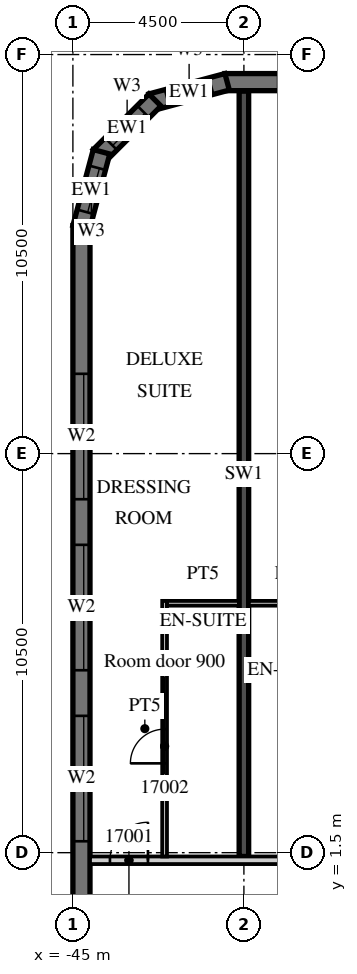
"""IFC4 building model, lengths in metres.
Left out: names, types, materials, properties, quantities, classifications, styles, units other than length and angle.
Written with IfcOpenShell. Run it as: python <this file> out.ifc"""

import sys

from ifc_helpers import new_model, si_unit, direction, frame, frame_2d, origin, place, context, subcontext, project, spatial, polyline, rectangle, outline, extrude, element, fill, save


model = new_model("IFC4")
c1 = context("Model", 3, precision=1e-05, world=origin(), true_north=direction((0.0, 1.0)))
c2 = subcontext(c1, "Body", "Model", "MODEL_VIEW")
j1 = project(units=[si_unit("LENGTHUNIT", "METRE"), si_unit("PLANEANGLEUNIT", "RADIAN")], contexts=[c1])
p1 = place(None, origin())
s1 = spatial("IfcSite", under=j1, at=p1, CompositionType="ELEMENT")
p2 = place(p1, origin())
s2 = spatial("IfcBuilding", under=s1, at=p2, CompositionType="ELEMENT")
p3 = place(p2, frame((0.0, 0.0, 86.4)))
s3 = spatial("IfcBuildingStorey", under=s2, at=p3, CompositionType="ELEMENT", Elevation=86.4)
p4 = place(p3, frame((-40.5, 1.4, 0.0), z_axis=(0.0, 0.0, 1.0), x_axis=(0.0, 1.0, 0.0)))
e1 = element("IfcWall", 1, at=p4, inside=s3, PredefinedType="SHEAR", context=c2, shape_type="SweptSolid", body=[
    extrude(rectangle(XDim=20.14, YDim=0.25, at=frame_2d((10.07, 0.0))), origin(), (0.0, 0.0, 1.0), 3.3),
])
p5 = place(p3, frame((13.5, 21.775, 0.0), z_axis=(0.0, 0.0, 1.0), x_axis=(-1.0, 0.0, 0.0)))
e2 = element("IfcWall", 2, at=p5, inside=s3, PredefinedType="SOLIDWALL", context=c2, shape_type="SweptSolid", body=[
    extrude(rectangle(XDim=54.5, YDim=0.45, at=frame_2d((27.25, 0.0))), origin(), (0.0, 0.0, 1.0), 3.02),
])
p6 = place(p5, frame((0.9, 0.0, 0.45)))
e3 = element("IfcOpeningElement", 3, at=p6, cuts=e2, PredefinedType="OPENING", context=c2, shape_type="SweptSolid", body=[
    extrude(rectangle(XDim=2.7, YDim=2.25, at=frame_2d((1.35, 1.125))), frame((0.0, 0.235, 0.0), z_axis=(0.0, -1.0, 0.0), x_axis=(1.0, 0.0, 0.0)), (0.0, 0.0, 1.0), 0.47),
])
p7 = place(p5, frame((5.4, 0.0, 0.45)))
e4 = element("IfcOpeningElement", 4, at=p7, cuts=e2, PredefinedType="OPENING", context=c2, shape_type="SweptSolid", body=[
    extrude(rectangle(XDim=2.7, YDim=2.25, at=frame_2d((1.35, 1.125))), frame((0.0, 0.235, 0.0), z_axis=(0.0, -1.0, 0.0), x_axis=(1.0, 0.0, 0.0)), (0.0, 0.0, 1.0), 0.47),
])
p8 = place(p5, frame((9.9, 0.0, 0.45)))
e5 = element("IfcOpeningElement", 5, at=p8, cuts=e2, PredefinedType="OPENING", context=c2, shape_type="SweptSolid", body=[
    extrude(rectangle(XDim=2.7, YDim=2.25, at=frame_2d((1.35, 1.125))), frame((0.0, 0.235, 0.0), z_axis=(0.0, -1.0, 0.0), x_axis=(1.0, 0.0, 0.0)), (0.0, 0.0, 1.0), 0.47),
])
p9 = place(p5, frame((14.4, 0.0, 0.45)))
e6 = element("IfcOpeningElement", 6, at=p9, cuts=e2, PredefinedType="OPENING", context=c2, shape_type="SweptSolid", body=[
    extrude(rectangle(XDim=2.7, YDim=2.25, at=frame_2d((1.35, 1.125))), frame((0.0, 0.235, 0.0), z_axis=(0.0, -1.0, 0.0), x_axis=(1.0, 0.0, 0.0)), (0.0, 0.0, 1.0), 0.47),
])
p10 = place(p5, frame((18.9, 0.0, 0.45)))
e7 = element("IfcOpeningElement", 7, at=p10, cuts=e2, PredefinedType="OPENING", context=c2, shape_type="SweptSolid", body=[
    extrude(rectangle(XDim=2.7, YDim=2.25, at=frame_2d((1.35, 1.125))), frame((0.0, 0.235, 0.0), z_axis=(0.0, -1.0, 0.0), x_axis=(1.0, 0.0, 0.0)), (0.0, 0.0, 1.0), 0.47),
])
p11 = place(p5, frame((23.4, 0.0, 0.45)))
e8 = element("IfcOpeningElement", 8, at=p11, cuts=e2, PredefinedType="OPENING", context=c2, shape_type="SweptSolid", body=[
    extrude(rectangle(XDim=2.7, YDim=2.25, at=frame_2d((1.35, 1.125))), frame((0.0, 0.235, 0.0), z_axis=(0.0, -1.0, 0.0), x_axis=(1.0, 0.0, 0.0)), (0.0, 0.0, 1.0), 0.47),
])
p12 = place(p5, frame((27.9, 0.0, 0.45)))
e9 = element("IfcOpeningElement", 9, at=p12, cuts=e2, PredefinedType="OPENING", context=c2, shape_type="SweptSolid", body=[
    extrude(rectangle(XDim=2.7, YDim=2.25, at=frame_2d((1.35, 1.125))), frame((0.0, 0.235, 0.0), z_axis=(0.0, -1.0, 0.0), x_axis=(1.0, 0.0, 0.0)), (0.0, 0.0, 1.0), 0.47),
])
p13 = place(p5, frame((32.4, 0.0, 0.45)))
e10 = element("IfcOpeningElement", 10, at=p13, cuts=e2, PredefinedType="OPENING", context=c2, shape_type="SweptSolid", body=[
    extrude(rectangle(XDim=2.7, YDim=2.25, at=frame_2d((1.35, 1.125))), frame((0.0, 0.235, 0.0), z_axis=(0.0, -1.0, 0.0), x_axis=(1.0, 0.0, 0.0)), (0.0, 0.0, 1.0), 0.47),
])
p14 = place(p5, frame((36.9, 0.0, 0.45)))
e11 = element("IfcOpeningElement", 11, at=p14, cuts=e2, PredefinedType="OPENING", context=c2, shape_type="SweptSolid", body=[
    extrude(rectangle(XDim=2.7, YDim=2.25, at=frame_2d((1.35, 1.125))), frame((0.0, 0.235, 0.0), z_axis=(0.0, -1.0, 0.0), x_axis=(1.0, 0.0, 0.0)), (0.0, 0.0, 1.0), 0.47),
])
p15 = place(p5, frame((41.4, 0.0, 0.45)))
e12 = element("IfcOpeningElement", 12, at=p15, cuts=e2, PredefinedType="OPENING", context=c2, shape_type="SweptSolid", body=[
    extrude(rectangle(XDim=2.7, YDim=2.25, at=frame_2d((1.35, 1.125))), frame((0.0, 0.235, 0.0), z_axis=(0.0, -1.0, 0.0), x_axis=(1.0, 0.0, 0.0)), (0.0, 0.0, 1.0), 0.47),
])
p16 = place(p5, frame((45.9, 0.0, 0.45)))
e13 = element("IfcOpeningElement", 13, at=p16, cuts=e2, PredefinedType="OPENING", context=c2, shape_type="SweptSolid", body=[
    extrude(rectangle(XDim=2.7, YDim=2.25, at=frame_2d((1.35, 1.125))), frame((0.0, 0.235, 0.0), z_axis=(0.0, -1.0, 0.0), x_axis=(1.0, 0.0, 0.0)), (0.0, 0.0, 1.0), 0.47),
])
p17 = place(p5, frame((50.4, 0.0, 0.45)))
e14 = element("IfcOpeningElement", 14, at=p17, cuts=e2, PredefinedType="OPENING", context=c2, shape_type="SweptSolid", body=[
    extrude(rectangle(XDim=2.7, YDim=2.25, at=frame_2d((1.35, 1.125))), frame((0.0, 0.235, 0.0), z_axis=(0.0, -1.0, 0.0), x_axis=(1.0, 0.0, 0.0)), (0.0, 0.0, 1.0), 0.47),
])
p18 = place(p3, frame((-40.942, 21.783, 0.0), z_axis=(0.0, 0.0, 1.0), x_axis=(-0.965926999034, -0.25881466832, 0.0)))
e15 = element("IfcWall", 15, at=p18, inside=s3, PredefinedType="SOLIDWALL", context=c2, shape_type="SweptSolid", body=[
    extrude(outline(polyline([(0.0, -0.225), (2.071, -0.225), (1.95, 0.225), (0.121, 0.225), (0.0, -0.225)])), origin(), (0.0, 0.0, 1.0), 3.02),
])
p19 = place(p18, frame((0.435, 0.0, 0.45)))
e16 = element("IfcOpeningElement", 16, at=p19, cuts=e15, PredefinedType="OPENING", context=c2, shape_type="SweptSolid", body=[
    extrude(rectangle(XDim=1.2, YDim=2.25, at=frame_2d((0.6, 1.125))), frame((0.0, 0.235, 0.0), z_axis=(0.0, -1.0, 0.0), x_axis=(1.0, 0.0, 0.0)), (0.0, 0.0, 1.0), 0.47),
])
p20 = place(p3, frame((-42.841, 21.305, 0.0), z_axis=(0.0, 0.0, 1.0), x_axis=(-0.707106781187, -0.707106781187, 0.0)))
e17 = element("IfcWall", 17, at=p20, inside=s3, PredefinedType="SOLIDWALL", context=c2, shape_type="SweptSolid", body=[
    extrude(outline(polyline([(0.0, -0.225), (2.071, -0.225), (1.95, 0.225), (0.121, 0.225), (0.0, -0.225)])), origin(), (0.0, 0.0, 1.0), 3.02),
])
p21 = place(p20, frame((0.435, 0.0, 0.45)))
e18 = element("IfcOpeningElement", 18, at=p21, cuts=e17, PredefinedType="OPENING", context=c2, shape_type="SweptSolid", body=[
    extrude(rectangle(XDim=1.2, YDim=2.25, at=frame_2d((0.6, 1.125))), frame((0.0, 0.235, 0.0), z_axis=(0.0, -1.0, 0.0), x_axis=(1.0, 0.0, 0.0)), (0.0, 0.0, 1.0), 0.47),
])
p22 = place(p3, frame((-44.247, 19.942, 0.0), z_axis=(0.0, 0.0, 1.0), x_axis=(-0.25881466832, -0.965926999034, 0.0)))
e19 = element("IfcWall", 19, at=p22, inside=s3, PredefinedType="SOLIDWALL", context=c2, shape_type="SweptSolid", body=[
    extrude(outline(polyline([(-0.0, -0.225), (2.07, -0.225), (1.95, 0.225), (0.12, 0.225), (-0.0, -0.225)])), origin(), (0.0, 0.0, 1.0), 3.02),
])
p23 = place(p22, frame((0.435, 0.0, 0.45)))
e20 = element("IfcOpeningElement", 20, at=p23, cuts=e19, PredefinedType="OPENING", context=c2, shape_type="SweptSolid", body=[
    extrude(rectangle(XDim=1.2, YDim=2.25, at=frame_2d((0.6, 1.125))), frame((0.0, 0.235, 0.0), z_axis=(0.0, -1.0, 0.0), x_axis=(1.0, 0.0, 0.0)), (0.0, 0.0, 1.0), 0.47),
])
p24 = place(p3, frame((-44.775, 18.0, 0.0), z_axis=(0.0, 0.0, 1.0), x_axis=(0.0, -1.0, 0.0)))
e21 = element("IfcWall", 21, at=p24, inside=s3, PredefinedType="SOLIDWALL", context=c2, shape_type="SweptSolid", body=[
    extrude(rectangle(XDim=36.0, YDim=0.45, at=frame_2d((18.0, 0.0))), origin(), (0.0, 0.0, 1.0), 3.02),
])
p25 = place(p24, frame((3.9, 0.0, 0.45)))
e22 = element("IfcOpeningElement", 22, at=p25, cuts=e21, PredefinedType="OPENING", context=c2, shape_type="SweptSolid", body=[
    extrude(rectangle(XDim=3.3, YDim=2.25, at=frame_2d((1.65, 1.125))), frame((0.0, 0.235, 0.0), z_axis=(0.0, -1.0, 0.0), x_axis=(1.0, 0.0, 0.0)), (0.0, 0.0, 1.0), 0.47),
])
p26 = place(p24, frame((8.4, 0.0, 0.45)))
e23 = element("IfcOpeningElement", 23, at=p26, cuts=e21, PredefinedType="OPENING", context=c2, shape_type="SweptSolid", body=[
    extrude(rectangle(XDim=3.3, YDim=2.25, at=frame_2d((1.65, 1.125))), frame((0.0, 0.235, 0.0), z_axis=(0.0, -1.0, 0.0), x_axis=(1.0, 0.0, 0.0)), (0.0, 0.0, 1.0), 0.47),
])
p27 = place(p24, frame((12.9, 0.0, 0.45)))
e24 = element("IfcOpeningElement", 24, at=p27, cuts=e21, PredefinedType="OPENING", context=c2, shape_type="SweptSolid", body=[
    extrude(rectangle(XDim=3.3, YDim=2.25, at=frame_2d((1.65, 1.125))), frame((0.0, 0.235, 0.0), z_axis=(0.0, -1.0, 0.0), x_axis=(1.0, 0.0, 0.0)), (0.0, 0.0, 1.0), 0.47),
])
p28 = place(p3, frame((-44.55, 1.3, 0.0), z_axis=(0.0, 0.0, 1.0), x_axis=(1.0, 0.0, 0.0)))
e25 = element("IfcWall", 25, at=p28, inside=s3, PredefinedType="PARTITIONING", context=c2, shape_type="SweptSolid", body=[
    extrude(rectangle(XDim=58.05, YDim=0.2, at=frame_2d((29.025, 0.0))), origin(), (0.0, 0.0, 1.0), 3.02),
])
p29 = place(p28, frame((0.525, 0.0, 0.0)))
e26 = element("IfcOpeningElement", 26, at=p29, cuts=e25, PredefinedType="OPENING", context=c2, shape_type="SweptSolid", body=[
    extrude(rectangle(XDim=1.0, YDim=2.1, at=frame_2d((0.5, 1.05))), frame((0.0, 0.11, 0.0), z_axis=(0.0, -1.0, 0.0), x_axis=(1.0, 0.0, 0.0)), (0.0, 0.0, 1.0), 0.22),
])
p30 = place(p28, frame((6.975, 0.0, 0.0)))
e27 = element("IfcOpeningElement", 27, at=p30, cuts=e25, PredefinedType="OPENING", context=c2, shape_type="SweptSolid", body=[
    extrude(rectangle(XDim=1.0, YDim=2.1, at=frame_2d((0.5, 1.05))), frame((0.0, 0.11, 0.0), z_axis=(0.0, -1.0, 0.0), x_axis=(1.0, 0.0, 0.0)), (0.0, 0.0, 1.0), 0.22),
])
p31 = place(p28, frame((11.5, 0.0, 0.0)))
e28 = element("IfcOpeningElement", 28, at=p31, cuts=e25, PredefinedType="OPENING", context=c2, shape_type="SweptSolid", body=[
    extrude(rectangle(XDim=1.0, YDim=2.1, at=frame_2d((0.5, 1.05))), frame((0.0, 0.11, 0.0), z_axis=(0.0, -1.0, 0.0), x_axis=(1.0, 0.0, 0.0)), (0.0, 0.0, 1.0), 0.22),
])
p32 = place(p28, frame((13.6, 0.0, 0.0)))
e29 = element("IfcOpeningElement", 29, at=p32, cuts=e25, PredefinedType="OPENING", context=c2, shape_type="SweptSolid", body=[
    extrude(rectangle(XDim=1.0, YDim=2.1, at=frame_2d((0.5, 1.05))), frame((0.0, 0.11, 0.0), z_axis=(0.0, -1.0, 0.0), x_axis=(1.0, 0.0, 0.0)), (0.0, 0.0, 1.0), 0.22),
])
p33 = place(p28, frame((22.912, 0.0, 0.0)))
e30 = element("IfcOpeningElement", 30, at=p33, cuts=e25, PredefinedType="OPENING", context=c2, shape_type="SweptSolid", body=[
    extrude(rectangle(XDim=1.2, YDim=2.1, at=frame_2d((0.6, 1.05))), frame((0.0, 0.11, 0.0), z_axis=(0.0, -1.0, 0.0), x_axis=(1.0, 0.0, 0.0)), (0.0, 0.0, 1.0), 0.22),
])
p34 = place(p28, frame((31.912, 0.0, 0.0)))
e31 = element("IfcOpeningElement", 31, at=p34, cuts=e25, PredefinedType="OPENING", context=c2, shape_type="SweptSolid", body=[
    extrude(rectangle(XDim=1.2, YDim=2.1, at=frame_2d((0.6, 1.05))), frame((0.0, 0.11, 0.0), z_axis=(0.0, -1.0, 0.0), x_axis=(1.0, 0.0, 0.0)), (0.0, 0.0, 1.0), 0.22),
])
p35 = place(p28, frame((37.987, 0.0, 0.0)))
e32 = element("IfcOpeningElement", 32, at=p35, cuts=e25, PredefinedType="OPENING", context=c2, shape_type="SweptSolid", body=[
    extrude(rectangle(XDim=1.2, YDim=2.1, at=frame_2d((0.6, 1.05))), frame((0.0, 0.11, 0.0), z_axis=(0.0, -1.0, 0.0), x_axis=(1.0, 0.0, 0.0)), (0.0, 0.0, 1.0), 0.22),
])
p36 = place(p28, frame((46.987, 0.0, 0.0)))
e33 = element("IfcOpeningElement", 33, at=p36, cuts=e25, PredefinedType="OPENING", context=c2, shape_type="SweptSolid", body=[
    extrude(rectangle(XDim=1.2, YDim=2.1, at=frame_2d((0.6, 1.05))), frame((0.0, 0.11, 0.0), z_axis=(0.0, -1.0, 0.0), x_axis=(1.0, 0.0, 0.0)), (0.0, 0.0, 1.0), 0.22),
])
p37 = place(p28, frame((54.125, 0.0, 0.0)))
e34 = element("IfcOpeningElement", 34, at=p37, cuts=e25, PredefinedType="OPENING", context=c2, shape_type="SweptSolid", body=[
    extrude(rectangle(XDim=1.0, YDim=2.1, at=frame_2d((0.5, 1.05))), frame((0.0, 0.11, 0.0), z_axis=(0.0, -1.0, 0.0), x_axis=(1.0, 0.0, 0.0)), (0.0, 0.0, 1.0), 0.22),
])
p38 = place(p3, frame((-42.587, 1.4, 0.0), z_axis=(0.0, 0.0, 1.0), x_axis=(0.0, 1.0, 0.0)))
e35 = element("IfcWall", 35, at=p38, inside=s3, PredefinedType="PARTITIONING", context=c2, shape_type="SweptSolid", body=[
    extrude(rectangle(XDim=6.725, YDim=0.125, at=frame_2d((3.363, 0.0))), origin(), (0.0, 0.0, 1.0), 3.02),
])
p39 = place(p38, frame((2.45, 0.0, 0.0)))
e36 = element("IfcOpeningElement", 36, at=p39, cuts=e35, PredefinedType="OPENING", context=c2, shape_type="SweptSolid", body=[
    extrude(rectangle(XDim=0.9, YDim=2.1, at=frame_2d((0.45, 1.05))), frame((0.0, 0.073, 0.0), z_axis=(0.0, -1.0, 0.0), x_axis=(1.0, 0.0, 0.0)), (0.0, 0.0, 1.0), 0.145),
])
p40 = place(p3, frame((-42.525, 8.062, 0.0), z_axis=(0.0, 0.0, 1.0), x_axis=(1.0, 0.0, 0.0)))
e37 = element("IfcWall", 37, at=p40, inside=s3, PredefinedType="PARTITIONING", context=c2, shape_type="SweptSolid", body=[
    extrude(rectangle(XDim=1.9, YDim=0.125, at=frame_2d((0.95, 0.0))), origin(), (0.0, 0.0, 1.0), 3.02),
])
p41 = place(p3, frame((-40.375, 8.062, 0.0), z_axis=(0.0, 0.0, 1.0), x_axis=(1.0, 0.0, 0.0)))
e38 = element("IfcWall", 38, at=p41, inside=s3, PredefinedType="PARTITIONING", context=c2, shape_type="SweptSolid", body=[
    extrude(rectangle(XDim=2.225, YDim=0.125, at=frame_2d((1.113, 0.0))), origin(), (0.0, 0.0, 1.0), 3.02),
])
p42 = place(p19, origin())
e39 = element("IfcWindow", 39, at=p42, inside=s3, PartitioningType="SINGLE_PANEL", PredefinedType="WINDOW", context=c2, shape_type="SweptSolid", body=[
    extrude(rectangle(XDim=1.2, YDim=2.25, at=frame_2d((0.6, 1.125))), frame((0.0, 0.09, 0.0), z_axis=(0.0, -1.0, 0.0), x_axis=(1.0, 0.0, 0.0)), (0.0, 0.0, 1.0), 0.06),
])
fill(e16, e39)
p43 = place(p21, origin())
e40 = element("IfcWindow", 40, at=p43, inside=s3, PartitioningType="SINGLE_PANEL", PredefinedType="WINDOW", context=c2, shape_type="SweptSolid", body=[
    extrude(rectangle(XDim=1.2, YDim=2.25, at=frame_2d((0.6, 1.125))), frame((0.0, 0.09, 0.0), z_axis=(0.0, -1.0, 0.0), x_axis=(1.0, 0.0, 0.0)), (0.0, 0.0, 1.0), 0.06),
])
fill(e18, e40)
p44 = place(p23, origin())
e41 = element("IfcWindow", 41, at=p44, inside=s3, PartitioningType="SINGLE_PANEL", PredefinedType="WINDOW", context=c2, shape_type="SweptSolid", body=[
    extrude(rectangle(XDim=1.2, YDim=2.25, at=frame_2d((0.6, 1.125))), frame((0.0, 0.09, 0.0), z_axis=(0.0, -1.0, 0.0), x_axis=(1.0, 0.0, 0.0)), (0.0, 0.0, 1.0), 0.06),
])
fill(e20, e41)
p45 = place(p25, origin())
e42 = element("IfcWindow", 42, at=p45, inside=s3, PartitioningType="SINGLE_PANEL", PredefinedType="WINDOW", context=c2, shape_type="SweptSolid", body=[
    extrude(rectangle(XDim=3.3, YDim=2.25, at=frame_2d((1.65, 1.125))), frame((0.0, 0.09, 0.0), z_axis=(0.0, -1.0, 0.0), x_axis=(1.0, 0.0, 0.0)), (0.0, 0.0, 1.0), 0.06),
])
fill(e22, e42)
p46 = place(p26, origin())
e43 = element("IfcWindow", 43, at=p46, inside=s3, PartitioningType="SINGLE_PANEL", PredefinedType="WINDOW", context=c2, shape_type="SweptSolid", body=[
    extrude(rectangle(XDim=3.3, YDim=2.25, at=frame_2d((1.65, 1.125))), frame((0.0, 0.09, 0.0), z_axis=(0.0, -1.0, 0.0), x_axis=(1.0, 0.0, 0.0)), (0.0, 0.0, 1.0), 0.06),
])
fill(e23, e43)
p47 = place(p27, origin())
e44 = element("IfcWindow", 44, at=p47, inside=s3, PartitioningType="SINGLE_PANEL", PredefinedType="WINDOW", context=c2, shape_type="SweptSolid", body=[
    extrude(rectangle(XDim=3.3, YDim=2.25, at=frame_2d((1.65, 1.125))), frame((0.0, 0.09, 0.0), z_axis=(0.0, -1.0, 0.0), x_axis=(1.0, 0.0, 0.0)), (0.0, 0.0, 1.0), 0.06),
])
fill(e24, e44)
p48 = place(p29, origin())
e45 = element("IfcDoor", 45, at=p48, inside=s3, OperationType="SINGLE_SWING_RIGHT", PredefinedType="DOOR", context=c2, shape_type="SweptSolid", body=[
    extrude(rectangle(XDim=1.0, YDim=2.1, at=frame_2d((0.5, 1.05))), frame((0.0, 0.025, 0.0), z_axis=(0.0, -1.0, 0.0), x_axis=(1.0, 0.0, 0.0)), (0.0, 0.0, 1.0), 0.05),
])
fill(e26, e45)
p49 = place(p39, origin())
e46 = element("IfcDoor", 46, at=p49, inside=s3, OperationType="SINGLE_SWING_LEFT", PredefinedType="DOOR", context=c2, shape_type="SweptSolid", body=[
    extrude(rectangle(XDim=0.9, YDim=2.1, at=frame_2d((0.45, 1.05))), frame((0.0, 0.025, 0.0), z_axis=(0.0, -1.0, 0.0), x_axis=(1.0, 0.0, 0.0)), (0.0, 0.0, 1.0), 0.05),
])
fill(e36, e46)
save(model, sys.argv[1])
